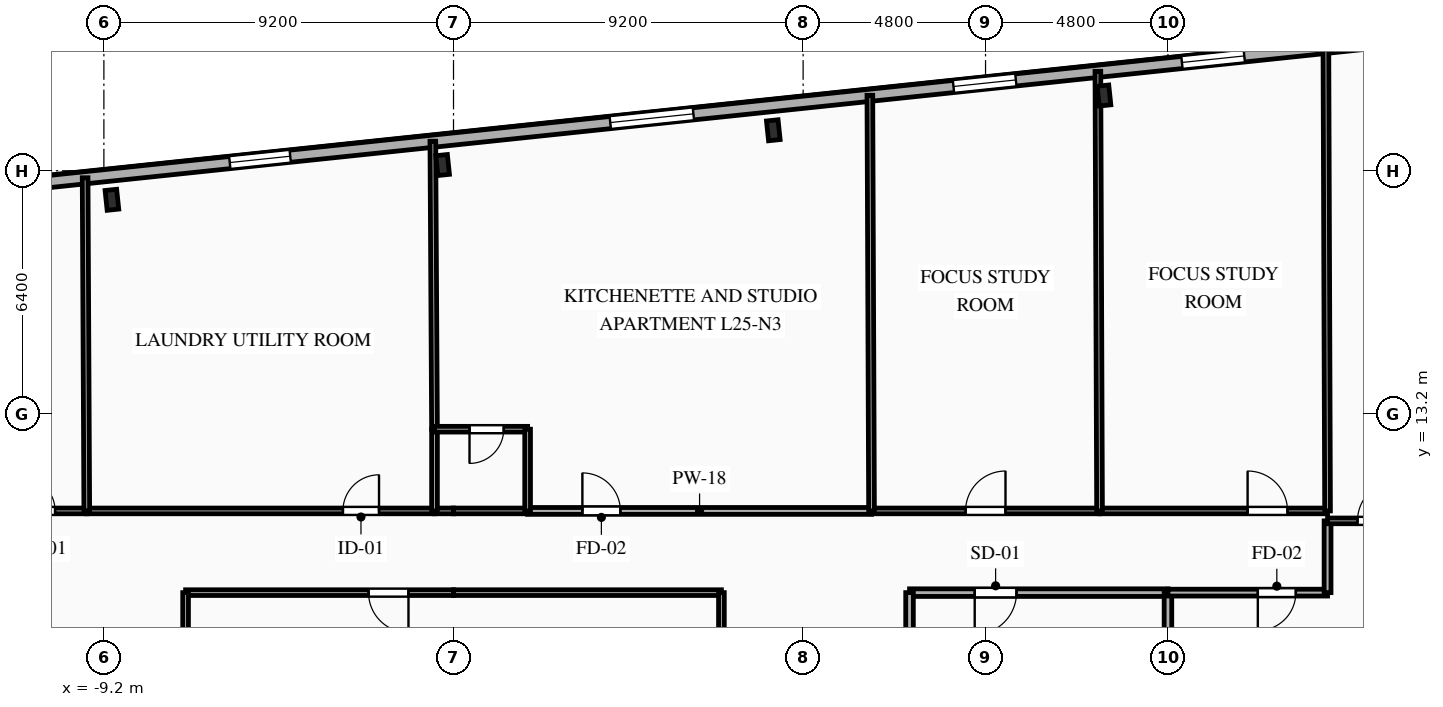
"""IFC4 building model, lengths in metres.
Left out: names, types, materials, properties, quantities, classifications, styles, units other than length and angle.
Written with IfcOpenShell. Run it as: python <this file> out.ifc"""

import sys

from ifc_helpers import new_model, si_unit, direction, frame, frame_2d, origin, origin_2d, place, context, subcontext, project, spatial, rectangle, i_section, extrude, element, fill, save


model = new_model("IFC4")
c1 = context("Model", 3, precision=1e-05, world=origin(), true_north=direction((0.0, 1.0)))
c2 = subcontext(c1, "Body", "Model", "MODEL_VIEW")
j1 = project(units=[si_unit("LENGTHUNIT", "METRE"), si_unit("PLANEANGLEUNIT", "RADIAN")], contexts=[c1])
p1 = place(None, origin())
s1 = spatial("IfcSite", under=j1, at=p1, CompositionType="ELEMENT")
p2 = place(p1, origin())
s2 = spatial("IfcBuilding", under=s1, at=p2, CompositionType="ELEMENT")
p3 = place(p2, frame((0.0, 0.0, 92.4)))
s3 = spatial("IfcBuildingStorey", under=s2, at=p3, CompositionType="ELEMENT", Elevation=92.4)
for number, where, z_axis, x_axis in (
    (1, (17.117, 21.58, 0.0), (0.0, 0.0, 1.0), (0.995, 0.105, 0.0)),
    (2, (8.415, 20.666, 0.0), (0.0, 0.0, 1.0), (0.995, 0.105, 0.0)),
    (3, (-0.287, 19.751, 0.0), (0.0, 0.0, 1.0), (0.995, 0.105, 0.0)),
    (4, (-8.989, 18.836, 0.0), (0.0, 0.0, 1.0), (0.995, 0.105, 0.0)),
):
    element("IfcColumn", number, at=place(p3, frame(where, z_axis=z_axis, x_axis=x_axis)), inside=s3, PredefinedType="COLUMN", context=c2, shape_type="SweptSolid", body=[
        extrude(i_section(OverallWidth=0.306, OverallDepth=0.524, WebThickness=0.021, FlangeThickness=0.04, FilletRadius=0.027, at=origin_2d()), origin(), (0.0, 0.0, 1.0), 3.35),
    ])
p4 = place(p3, frame((-27.107, 17.586, 0.0), z_axis=(0.0, 0.0, 1.0), x_axis=(0.994521628355, 0.104531003701, 0.0)))
e5 = element("IfcWall", 5, at=p4, inside=s3, PredefinedType="SOLIDWALL", context=c2, shape_type="SweptSolid", body=[
    extrude(rectangle(XDim=53.8, YDim=0.32, at=frame_2d((26.9, 0.0))), origin(), (0.0, 0.0, 1.0), 3.045),
])
p5 = place(p4, frame((1.482, 0.0, 0.85)))
e6 = element("IfcOpeningElement", 6, at=p5, cuts=e5, PredefinedType="OPENING", context=c2, shape_type="SweptSolid", body=[
    extrude(rectangle(XDim=1.6, YDim=1.85, at=frame_2d((0.8, 0.925))), frame((0.0, 0.17, 0.0), z_axis=(0.0, -1.0, 0.0), x_axis=(1.0, 0.0, 0.0)), (0.0, 0.0, 1.0), 0.34),
])
p6 = place(p4, frame((6.02, 0.0, 0.85)))
e7 = element("IfcOpeningElement", 7, at=p6, cuts=e5, PredefinedType="OPENING", context=c2, shape_type="SweptSolid", body=[
    extrude(rectangle(XDim=1.65, YDim=1.85, at=frame_2d((0.825, 0.925))), frame((0.0, 0.17, 0.0), z_axis=(0.0, -1.0, 0.0), x_axis=(1.0, 0.0, 0.0)), (0.0, 0.0, 1.0), 0.34),
])
p7 = place(p4, frame((11.584, 0.0, 0.85)))
e8 = element("IfcOpeningElement", 8, at=p7, cuts=e5, PredefinedType="OPENING", context=c2, shape_type="SweptSolid", body=[
    extrude(rectangle(XDim=1.65, YDim=1.85, at=frame_2d((0.825, 0.925))), frame((0.0, 0.17, 0.0), z_axis=(0.0, -1.0, 0.0), x_axis=(1.0, 0.0, 0.0)), (0.0, 0.0, 1.0), 0.34),
])
p8 = place(p4, frame((21.336, 0.0, 0.85)))
e9 = element("IfcOpeningElement", 9, at=p8, cuts=e5, PredefinedType="OPENING", context=c2, shape_type="SweptSolid", body=[
    extrude(rectangle(XDim=1.6, YDim=1.85, at=frame_2d((0.8, 0.925))), frame((0.0, 0.17, 0.0), z_axis=(0.0, -1.0, 0.0), x_axis=(1.0, 0.0, 0.0)), (0.0, 0.0, 1.0), 0.34),
])
p9 = place(p4, frame((31.404, 0.0, 0.85)))
e10 = element("IfcOpeningElement", 10, at=p9, cuts=e5, PredefinedType="OPENING", context=c2, shape_type="SweptSolid", body=[
    extrude(rectangle(XDim=2.2, YDim=1.85, at=frame_2d((1.1, 0.925))), frame((0.0, 0.17, 0.0), z_axis=(0.0, -1.0, 0.0), x_axis=(1.0, 0.0, 0.0)), (0.0, 0.0, 1.0), 0.34),
])
p10 = place(p4, frame((40.486, 0.0, 0.85)))
e11 = element("IfcOpeningElement", 11, at=p10, cuts=e5, PredefinedType="OPENING", context=c2, shape_type="SweptSolid", body=[
    extrude(rectangle(XDim=1.65, YDim=1.85, at=frame_2d((0.825, 0.925))), frame((0.0, 0.17, 0.0), z_axis=(0.0, -1.0, 0.0), x_axis=(1.0, 0.0, 0.0)), (0.0, 0.0, 1.0), 0.34),
])
p11 = place(p4, frame((46.53, 0.0, 0.85)))
e12 = element("IfcOpeningElement", 12, at=p11, cuts=e5, PredefinedType="OPENING", context=c2, shape_type="SweptSolid", body=[
    extrude(rectangle(XDim=1.65, YDim=1.85, at=frame_2d((0.825, 0.925))), frame((0.0, 0.17, 0.0), z_axis=(0.0, -1.0, 0.0), x_axis=(1.0, 0.0, 0.0)), (0.0, 0.0, 1.0), 0.34),
])
p12 = place(p4, frame((51.054, 0.0, 0.85)))
e13 = element("IfcOpeningElement", 13, at=p12, cuts=e5, PredefinedType="OPENING", context=c2, shape_type="SweptSolid", body=[
    extrude(rectangle(XDim=1.65, YDim=1.85, at=frame_2d((0.825, 0.925))), frame((0.0, 0.17, 0.0), z_axis=(0.0, -1.0, 0.0), x_axis=(1.0, 0.0, 0.0)), (0.0, 0.0, 1.0), 0.34),
])
p13 = place(p3, frame((18.8, 8.5, 0.0), z_axis=(0.0, 0.0, 1.0), x_axis=(-1.0, 0.0, 0.0)))
e14 = element("IfcWall", 14, at=p13, inside=s3, PredefinedType="PARTITIONING", context=c2, shape_type="SweptSolid", body=[
    extrude(rectangle(XDim=6.8, YDim=0.2, at=frame_2d((3.4, 0.0))), origin(), (0.0, 0.0, 1.0), 3.045),
])
p14 = place(p13, frame((3.985, 0.0, 0.0)))
e15 = element("IfcOpeningElement", 15, at=p14, cuts=e14, PredefinedType="OPENING", context=c2, shape_type="SweptSolid", body=[
    extrude(rectangle(XDim=1.1, YDim=2.15, at=frame_2d((0.55, 1.075))), frame((0.0, 0.11, 0.0), z_axis=(0.0, -1.0, 0.0), x_axis=(1.0, 0.0, 0.0)), (0.0, 0.0, 1.0), 0.22),
])
p15 = place(p3, frame((12.0, 8.5, 0.0), z_axis=(0.0, 0.0, 1.0), x_axis=(0.0, -1.0, 0.0)))
e16 = element("IfcWall", 16, at=p15, inside=s3, PredefinedType="PARTITIONING", context=c2, shape_type="SweptSolid", body=[
    extrude(rectangle(XDim=2.9, YDim=0.2, at=frame_2d((1.45, 0.0))), origin(), (0.0, 0.0, 1.0), 3.045),
])
p16 = place(p3, frame((18.8, 5.6, 0.0), z_axis=(0.0, 0.0, 1.0), x_axis=(0.0, 1.0, 0.0)))
e17 = element("IfcWall", 17, at=p16, inside=s3, PredefinedType="PARTITIONING", context=c2, shape_type="SweptSolid", body=[
    extrude(rectangle(XDim=2.9, YDim=0.2, at=frame_2d((1.45, 0.0))), origin(), (0.0, 0.0, 1.0), 2.53),
])
p17 = place(p3, frame((-12.0, 10.65, 0.0), z_axis=(0.0, 0.0, 1.0), x_axis=(1.0, 0.0, 0.0)))
e18 = element("IfcWall", 18, at=p17, inside=s3, PredefinedType="PLUMBINGWALL", context=c2, shape_type="SweptSolid", body=[
    extrude(rectangle(XDim=2.35, YDim=0.15, at=frame_2d((1.175, 0.0))), origin(), (0.0, 0.0, 1.0), 3.045),
])
p18 = place(p17, frame((0.616, 0.0, 0.0)))
e19 = element("IfcOpeningElement", 19, at=p18, cuts=e18, PredefinedType="OPENING", context=c2, shape_type="SweptSolid", body=[
    extrude(rectangle(XDim=0.9, YDim=2.1, at=frame_2d((0.45, 1.05))), frame((0.0, 0.085, 0.0), z_axis=(0.0, -1.0, 0.0), x_axis=(1.0, 0.0, 0.0)), (0.0, 0.0, 1.0), 0.17),
])
p19 = place(p3, frame((-9.65, 10.65, 0.0), z_axis=(0.0, 0.0, 1.0), x_axis=(1.0, 0.0, 0.0)))
e20 = element("IfcWall", 20, at=p19, inside=s3, PredefinedType="PARTITIONING", context=c2, shape_type="SweptSolid", body=[
    extrude(rectangle(XDim=9.15, YDim=0.15, at=frame_2d((4.575, 0.0))), origin(), (0.0, 0.0, 1.0), 3.045),
])
p20 = place(p19, frame((6.74, 0.0, 0.0)))
e21 = element("IfcOpeningElement", 21, at=p20, cuts=e20, PredefinedType="OPENING", context=c2, shape_type="SweptSolid", body=[
    extrude(rectangle(XDim=0.95, YDim=2.1, at=frame_2d((0.475, 1.05))), frame((0.0, 0.085, 0.0), z_axis=(0.0, -1.0, 0.0), x_axis=(1.0, 0.0, 0.0)), (0.0, 0.0, 1.0), 0.17),
])
p21 = place(p3, frame((-0.5, 10.65, 0.0), z_axis=(0.0, 0.0, 1.0), x_axis=(1.0, 0.0, 0.0)))
e22 = element("IfcWall", 22, at=p21, inside=s3, PredefinedType="PLUMBINGWALL", context=c2, shape_type="SweptSolid", body=[
    extrude(rectangle(XDim=0.5, YDim=0.15, at=frame_2d((0.25, 0.0))), origin(), (0.0, 0.0, 1.0), 3.045),
])
p22 = place(p3, frame((0.0, 8.5, 0.0), z_axis=(0.0, 0.0, 1.0), x_axis=(-1.0, 0.0, 0.0)))
e23 = element("IfcWall", 23, at=p22, inside=s3, PredefinedType="PARTITIONING", context=c2, shape_type="SweptSolid", body=[
    extrude(rectangle(XDim=7.05, YDim=0.15, at=frame_2d((3.525, 0.0))), origin(), (0.0, 0.0, 1.0), 3.045),
])
p23 = place(p22, frame((1.185, 0.0, 0.0)))
e24 = element("IfcOpeningElement", 24, at=p23, cuts=e23, PredefinedType="OPENING", context=c2, shape_type="SweptSolid", body=[
    extrude(rectangle(XDim=1.05, YDim=2.15, at=frame_2d((0.525, 1.075))), frame((0.0, 0.085, 0.0), z_axis=(0.0, -1.0, 0.0), x_axis=(1.0, 0.0, 0.0)), (0.0, 0.0, 1.0), 0.17),
])
p24 = place(p3, frame((23.0, 8.5, 0.0), z_axis=(0.0, 0.0, 1.0), x_axis=(-1.0, 0.0, 0.0)))
e25 = element("IfcWall", 25, at=p24, inside=s3, PredefinedType="PARTITIONING", context=c2, shape_type="SweptSolid", body=[
    extrude(rectangle(XDim=4.2, YDim=0.18, at=frame_2d((2.1, 0.0))), origin(), (0.0, 0.0, 1.0), 3.045),
])
p25 = place(p24, frame((0.835, 0.0, 0.0)))
e26 = element("IfcOpeningElement", 26, at=p25, cuts=e25, PredefinedType="OPENING", context=c2, shape_type="SweptSolid", body=[
    extrude(rectangle(XDim=1.0, YDim=2.15, at=frame_2d((0.5, 1.075))), frame((0.0, 0.1, 0.0), z_axis=(0.0, -1.0, 0.0), x_axis=(1.0, 0.0, 0.0)), (0.0, 0.0, 1.0), 0.2),
])
p26 = place(p3, frame((23.0, 10.388, 0.0), z_axis=(0.0, 0.0, 1.0), x_axis=(0.0, -1.0, 0.0)))
e27 = element("IfcWall", 27, at=p26, inside=s3, PredefinedType="PARTITIONING", context=c2, shape_type="SweptSolid", body=[
    extrude(rectangle(XDim=1.888, YDim=0.18, at=frame_2d((0.944, 0.0))), origin(), (0.0, 0.0, 1.0), 3.045),
])
p27 = place(p3, frame((1.95, 10.65, 0.0), z_axis=(0.0, 0.0, 1.0), x_axis=(1.0, 0.0, 0.0)))
e28 = element("IfcWall", 28, at=p27, inside=s3, PredefinedType="PARTITIONING", context=c2, shape_type="SweptSolid", body=[
    extrude(rectangle(XDim=9.05, YDim=0.18, at=frame_2d((4.525, 0.0))), origin(), (0.0, 0.0, 1.0), 3.045),
])
p28 = place(p27, frame((1.441, 0.0, 0.0)))
e29 = element("IfcOpeningElement", 29, at=p28, cuts=e28, PredefinedType="OPENING", context=c2, shape_type="SweptSolid", body=[
    extrude(rectangle(XDim=1.0, YDim=2.15, at=frame_2d((0.5, 1.075))), frame((0.0, 0.1, 0.0), z_axis=(0.0, -1.0, 0.0), x_axis=(1.0, 0.0, 0.0)), (0.0, 0.0, 1.0), 0.2),
])
p29 = place(p3, frame((0.0, 10.65, 0.0), z_axis=(0.0, 0.0, 1.0), x_axis=(1.0, 0.0, 0.0)))
e30 = element("IfcWall", 30, at=p29, inside=s3, PredefinedType="PLUMBINGWALL", context=c2, shape_type="SweptSolid", body=[
    extrude(rectangle(XDim=1.95, YDim=0.15, at=frame_2d((0.975, 0.0))), origin(), (0.0, 0.0, 1.0), 3.045),
])
p30 = place(p3, frame((11.0, 10.65, 0.0), z_axis=(0.0, 0.0, 1.0), x_axis=(1.0, 0.0, 0.0)))
e31 = element("IfcWall", 31, at=p30, inside=s3, PredefinedType="PARTITIONING", context=c2, shape_type="SweptSolid", body=[
    extrude(rectangle(XDim=6.0, YDim=0.15, at=frame_2d((3.0, 0.0))), origin(), (0.0, 0.0, 1.0), 3.045),
])
p31 = place(p30, frame((2.475, 0.0, 0.0)))
e32 = element("IfcOpeningElement", 32, at=p31, cuts=e31, PredefinedType="OPENING", context=c2, shape_type="SweptSolid", body=[
    extrude(rectangle(XDim=1.05, YDim=2.15, at=frame_2d((0.525, 1.075))), frame((0.0, 0.085, 0.0), z_axis=(0.0, -1.0, 0.0), x_axis=(1.0, 0.0, 0.0)), (0.0, 0.0, 1.0), 0.17),
])
p32 = place(p3, frame((17.0, 10.65, 0.0), z_axis=(0.0, 0.0, 1.0), x_axis=(1.0, 0.0, 0.0)))
e33 = element("IfcWall", 33, at=p32, inside=s3, PredefinedType="PARTITIONING", context=c2, shape_type="SweptSolid", body=[
    extrude(rectangle(XDim=6.0, YDim=0.15, at=frame_2d((3.0, 0.0))), origin(), (0.0, 0.0, 1.0), 3.045),
])
p33 = place(p32, frame((3.896, 0.0, 0.0)))
e34 = element("IfcOpeningElement", 34, at=p33, cuts=e33, PredefinedType="OPENING", context=c2, shape_type="SweptSolid", body=[
    extrude(rectangle(XDim=1.05, YDim=2.15, at=frame_2d((0.525, 1.075))), frame((0.0, 0.085, 0.0), z_axis=(0.0, -1.0, 0.0), x_axis=(1.0, 0.0, 0.0)), (0.0, 0.0, 1.0), 0.17),
])
for number, where, z_axis, x_axis in (
    (35, (7.05, 8.5, 0.0), (0.0, 0.0, 1.0), (-1.0, 0.0, 0.0)),
    (36, (-7.05, 8.5, 0.0), (0.0, 0.0, 1.0), (0.0, -1.0, 0.0)),
    (37, (7.05, 1.45, 0.0), (0.0, 0.0, 1.0), (0.0, 1.0, 0.0)),
):
    element("IfcWall", number, at=place(p3, frame(where, z_axis=z_axis, x_axis=x_axis)), inside=s3, PredefinedType="PARTITIONING", context=c2, shape_type="SweptSolid", body=[
        extrude(rectangle(XDim=7.05, YDim=0.15, at=frame_2d((3.525, 0.0))), origin(), (0.0, 0.0, 1.0), 3.045),
    ])
p34 = place(p3, frame((23.0, 10.388, 0.0), z_axis=(0.0, 0.0, 1.0), x_axis=(1.0, 0.0, 0.0)))
e38 = element("IfcWall", 38, at=p34, inside=s3, PredefinedType="PARTITIONING", context=c2, shape_type="SweptSolid", body=[
    extrude(rectangle(XDim=3.871, YDim=0.15, at=frame_2d((1.936, 0.0))), origin(), (0.0, 0.0, 1.0), 3.045),
])
p35 = place(p34, frame((0.788, 0.0, 0.0)))
e39 = element("IfcOpeningElement", 39, at=p35, cuts=e38, PredefinedType="OPENING", context=c2, shape_type="SweptSolid", body=[
    extrude(rectangle(XDim=1.05, YDim=2.15, at=frame_2d((0.525, 1.075))), frame((0.0, 0.085, 0.0), z_axis=(0.0, -1.0, 0.0), x_axis=(1.0, 0.0, 0.0)), (0.0, 0.0, 1.0), 0.17),
])
p36 = place(p3, frame((23.0, 10.65, 0.0), z_axis=(0.0, 0.0, 1.0), x_axis=(-0.0036027147, 0.999993510202, 0.0)))
e40 = element("IfcWall", 40, at=p36, inside=s3, PredefinedType="PARTITIONING", context=c2, shape_type="SweptSolid", body=[
    extrude(rectangle(XDim=12.198, YDim=0.15, at=frame_2d((6.099, 0.0))), origin(), (0.0, 0.0, 1.0), 3.045),
])
p37 = place(p3, frame((-9.694, 19.416, 0.0), z_axis=(0.0, 0.0, 1.0), x_axis=(0.005013026743, -0.999987434702, 0.0)))
e41 = element("IfcWall", 41, at=p37, inside=s3, PredefinedType="PLUMBINGWALL", context=c2, shape_type="SweptSolid", body=[
    extrude(rectangle(XDim=8.766, YDim=0.15, at=frame_2d((4.383, 0.0))), origin(), (0.0, 0.0, 1.0), 3.045),
])
p38 = place(p3, frame((-0.544, 20.378, 0.0), z_axis=(0.0, 0.0, 1.0), x_axis=(0.005799245221, -0.999983184236, 0.0)))
e42 = element("IfcWall", 42, at=p38, inside=s3, PredefinedType="PARTITIONING", context=c2, shape_type="SweptSolid", body=[
    extrude(rectangle(XDim=7.578, YDim=0.15, at=frame_2d((3.789, 0.0))), origin(), (0.0, 0.0, 1.0), 3.045),
])
p39 = place(p3, frame((-0.5, 12.8, 0.0), z_axis=(0.0, 0.0, 1.0), x_axis=(0.0, -1.0, 0.0)))
e43 = element("IfcWall", 43, at=p39, inside=s3, PredefinedType="PLUMBINGWALL", context=c2, shape_type="SweptSolid", body=[
    extrude(rectangle(XDim=2.15, YDim=0.15, at=frame_2d((1.075, 0.0))), origin(), (0.0, 0.0, 1.0), 3.045),
])
p40 = place(p3, frame((1.95, 12.8, 0.0), z_axis=(0.0, 0.0, 1.0), x_axis=(-1.0, 0.0, 0.0)))
e44 = element("IfcWall", 44, at=p40, inside=s3, PredefinedType="PLUMBINGWALL", context=c2, shape_type="SweptSolid", body=[
    extrude(rectangle(XDim=2.45, YDim=0.15, at=frame_2d((1.225, 0.0))), origin(), (0.0, 0.0, 1.0), 3.045),
])
p41 = place(p40, frame((0.629, 0.0, 0.0)))
e45 = element("IfcOpeningElement", 45, at=p41, cuts=e44, PredefinedType="OPENING", context=c2, shape_type="SweptSolid", body=[
    extrude(rectangle(XDim=0.9, YDim=2.1, at=frame_2d((0.45, 1.05))), frame((0.0, 0.085, 0.0), z_axis=(0.0, -1.0, 0.0), x_axis=(1.0, 0.0, 0.0)), (0.0, 0.0, 1.0), 0.17),
])
p42 = place(p3, frame((1.95, 10.65, 0.0), z_axis=(0.0, 0.0, 1.0), x_axis=(0.0, 1.0, 0.0)))
e46 = element("IfcWall", 46, at=p42, inside=s3, PredefinedType="PLUMBINGWALL", context=c2, shape_type="SweptSolid", body=[
    extrude(rectangle(XDim=2.15, YDim=0.15, at=frame_2d((1.075, 0.0))), origin(), (0.0, 0.0, 1.0), 3.045),
])
p43 = place(p3, frame((10.956, 21.586, 0.0), z_axis=(0.0, 0.0, 1.0), x_axis=(0.004018183473, -0.999991927068, 0.0)))
e47 = element("IfcWall", 47, at=p43, inside=s3, PredefinedType="PARTITIONING", context=c2, shape_type="SweptSolid", body=[
    extrude(rectangle(XDim=10.937, YDim=0.15, at=frame_2d((5.468, 0.0))), origin(), (0.0, 0.0, 1.0), 3.045),
])
p44 = place(p3, frame((16.956, 22.217, 0.0), z_axis=(0.0, 0.0, 1.0), x_axis=(0.003799124105, -0.999992783302, 0.0)))
e48 = element("IfcWall", 48, at=p44, inside=s3, PredefinedType="PARTITIONING", context=c2, shape_type="SweptSolid", body=[
    extrude(rectangle(XDim=11.567, YDim=0.15, at=frame_2d((5.784, 0.0))), origin(), (0.0, 0.0, 1.0), 2.53),
])
p45 = place(p8, origin())
e49 = element("IfcWindow", 49, at=p45, inside=s3, PartitioningType="SINGLE_PANEL", PredefinedType="WINDOW", context=c2, shape_type="SweptSolid", body=[
    extrude(rectangle(XDim=1.6, YDim=1.85, at=frame_2d((0.8, 0.925))), frame((0.0, 0.03, 0.0), z_axis=(0.0, -1.0, 0.0), x_axis=(1.0, 0.0, 0.0)), (0.0, 0.0, 1.0), 0.06),
])
fill(e9, e49)
p46 = place(p9, origin())
e50 = element("IfcWindow", 50, at=p46, inside=s3, PartitioningType="SINGLE_PANEL", PredefinedType="WINDOW", context=c2, shape_type="SweptSolid", body=[
    extrude(rectangle(XDim=2.2, YDim=1.85, at=frame_2d((1.1, 0.925))), frame((0.0, 0.03, 0.0), z_axis=(0.0, -1.0, 0.0), x_axis=(1.0, 0.0, 0.0)), (0.0, 0.0, 1.0), 0.06),
])
fill(e10, e50)
p47 = place(p10, origin())
e51 = element("IfcWindow", 51, at=p47, inside=s3, PartitioningType="SINGLE_PANEL", PredefinedType="WINDOW", context=c2, shape_type="SweptSolid", body=[
    extrude(rectangle(XDim=1.65, YDim=1.85, at=frame_2d((0.825, 0.925))), frame((0.0, 0.03, 0.0), z_axis=(0.0, -1.0, 0.0), x_axis=(1.0, 0.0, 0.0)), (0.0, 0.0, 1.0), 0.06),
])
fill(e11, e51)
p48 = place(p11, origin())
e52 = element("IfcWindow", 52, at=p48, inside=s3, PartitioningType="SINGLE_PANEL", PredefinedType="WINDOW", context=c2, shape_type="SweptSolid", body=[
    extrude(rectangle(XDim=1.65, YDim=1.85, at=frame_2d((0.825, 0.925))), frame((0.0, 0.03, 0.0), z_axis=(0.0, -1.0, 0.0), x_axis=(1.0, 0.0, 0.0)), (0.0, 0.0, 1.0), 0.06),
])
fill(e12, e52)
p49 = place(p14, origin())
e53 = element("IfcDoor", 53, at=p49, inside=s3, OperationType="SINGLE_SWING_RIGHT", PredefinedType="DOOR", context=c2, shape_type="SweptSolid", body=[
    extrude(rectangle(XDim=1.1, YDim=2.15, at=frame_2d((0.55, 1.075))), frame((0.0, 0.025, 0.0), z_axis=(0.0, -1.0, 0.0), x_axis=(1.0, 0.0, 0.0)), (0.0, 0.0, 1.0), 0.05),
])
fill(e15, e53)
p50 = place(p18, origin())
e54 = element("IfcDoor", 54, at=p50, inside=s3, OperationType="SINGLE_SWING_LEFT", PredefinedType="DOOR", context=c2, shape_type="SweptSolid", body=[
    extrude(rectangle(XDim=0.9, YDim=2.1, at=frame_2d((0.45, 1.05))), frame((0.0, 0.025, 0.0), z_axis=(0.0, -1.0, 0.0), x_axis=(1.0, 0.0, 0.0)), (0.0, 0.0, 1.0), 0.05),
])
fill(e19, e54)
p51 = place(p20, origin())
e55 = element("IfcDoor", 55, at=p51, inside=s3, OperationType="SINGLE_SWING_RIGHT", PredefinedType="DOOR", context=c2, shape_type="SweptSolid", body=[
    extrude(rectangle(XDim=0.95, YDim=2.1, at=frame_2d((0.475, 1.05))), frame((0.0, 0.025, 0.0), z_axis=(0.0, -1.0, 0.0), x_axis=(1.0, 0.0, 0.0)), (0.0, 0.0, 1.0), 0.05),
])
fill(e21, e55)
p52 = place(p23, origin())
e56 = element("IfcDoor", 56, at=p52, inside=s3, OperationType="SINGLE_SWING_LEFT", PredefinedType="DOOR", context=c2, shape_type="SweptSolid", body=[
    extrude(rectangle(XDim=1.05, YDim=2.15, at=frame_2d((0.525, 1.075))), frame((0.0, 0.025, 0.0), z_axis=(0.0, -1.0, 0.0), x_axis=(1.0, 0.0, 0.0)), (0.0, 0.0, 1.0), 0.05),
])
fill(e24, e56)
p53 = place(p25, origin())
e57 = element("IfcDoor", 57, at=p53, inside=s3, OperationType="SINGLE_SWING_RIGHT", PredefinedType="DOOR", context=c2, shape_type="SweptSolid", body=[
    extrude(rectangle(XDim=1.0, YDim=2.15, at=frame_2d((0.5, 1.075))), frame((0.0, 0.025, 0.0), z_axis=(0.0, -1.0, 0.0), x_axis=(1.0, 0.0, 0.0)), (0.0, 0.0, 1.0), 0.05),
])
fill(e26, e57)
p54 = place(p28, origin())
e58 = element("IfcDoor", 58, at=p54, inside=s3, OperationType="SINGLE_SWING_LEFT", PredefinedType="DOOR", context=c2, shape_type="SweptSolid", body=[
    extrude(rectangle(XDim=1.0, YDim=2.15, at=frame_2d((0.5, 1.075))), frame((0.0, 0.025, 0.0), z_axis=(0.0, -1.0, 0.0), x_axis=(1.0, 0.0, 0.0)), (0.0, 0.0, 1.0), 0.05),
])
fill(e29, e58)
p55 = place(p31, origin())
e59 = element("IfcDoor", 59, at=p55, inside=s3, OperationType="SINGLE_SWING_RIGHT", PredefinedType="DOOR", context=c2, shape_type="SweptSolid", body=[
    extrude(rectangle(XDim=1.05, YDim=2.15, at=frame_2d((0.525, 1.075))), frame((0.0, 0.025, 0.0), z_axis=(0.0, -1.0, 0.0), x_axis=(1.0, 0.0, 0.0)), (0.0, 0.0, 1.0), 0.05),
])
fill(e32, e59)
p56 = place(p33, origin())
e60 = element("IfcDoor", 60, at=p56, inside=s3, OperationType="SINGLE_SWING_LEFT", PredefinedType="DOOR", context=c2, shape_type="SweptSolid", body=[
    extrude(rectangle(XDim=1.05, YDim=2.15, at=frame_2d((0.525, 1.075))), frame((0.0, 0.025, 0.0), z_axis=(0.0, -1.0, 0.0), x_axis=(1.0, 0.0, 0.0)), (0.0, 0.0, 1.0), 0.05),
])
fill(e34, e60)
p57 = place(p35, origin())
e61 = element("IfcDoor", 61, at=p57, inside=s3, OperationType="SINGLE_SWING_RIGHT", PredefinedType="DOOR", context=c2, shape_type="SweptSolid", body=[
    extrude(rectangle(XDim=1.05, YDim=2.15, at=frame_2d((0.525, 1.075))), frame((0.0, 0.025, 0.0), z_axis=(0.0, -1.0, 0.0), x_axis=(1.0, 0.0, 0.0)), (0.0, 0.0, 1.0), 0.05),
])
fill(e39, e61)
p58 = place(p41, origin())
e62 = element("IfcDoor", 62, at=p58, inside=s3, OperationType="SINGLE_SWING_RIGHT", PredefinedType="DOOR", context=c2, shape_type="SweptSolid", body=[
    extrude(rectangle(XDim=0.9, YDim=2.1, at=frame_2d((0.45, 1.05))), frame((0.0, 0.025, 0.0), z_axis=(0.0, -1.0, 0.0), x_axis=(1.0, 0.0, 0.0)), (0.0, 0.0, 1.0), 0.05),
])
fill(e45, e62)
save(model, sys.argv[1])
